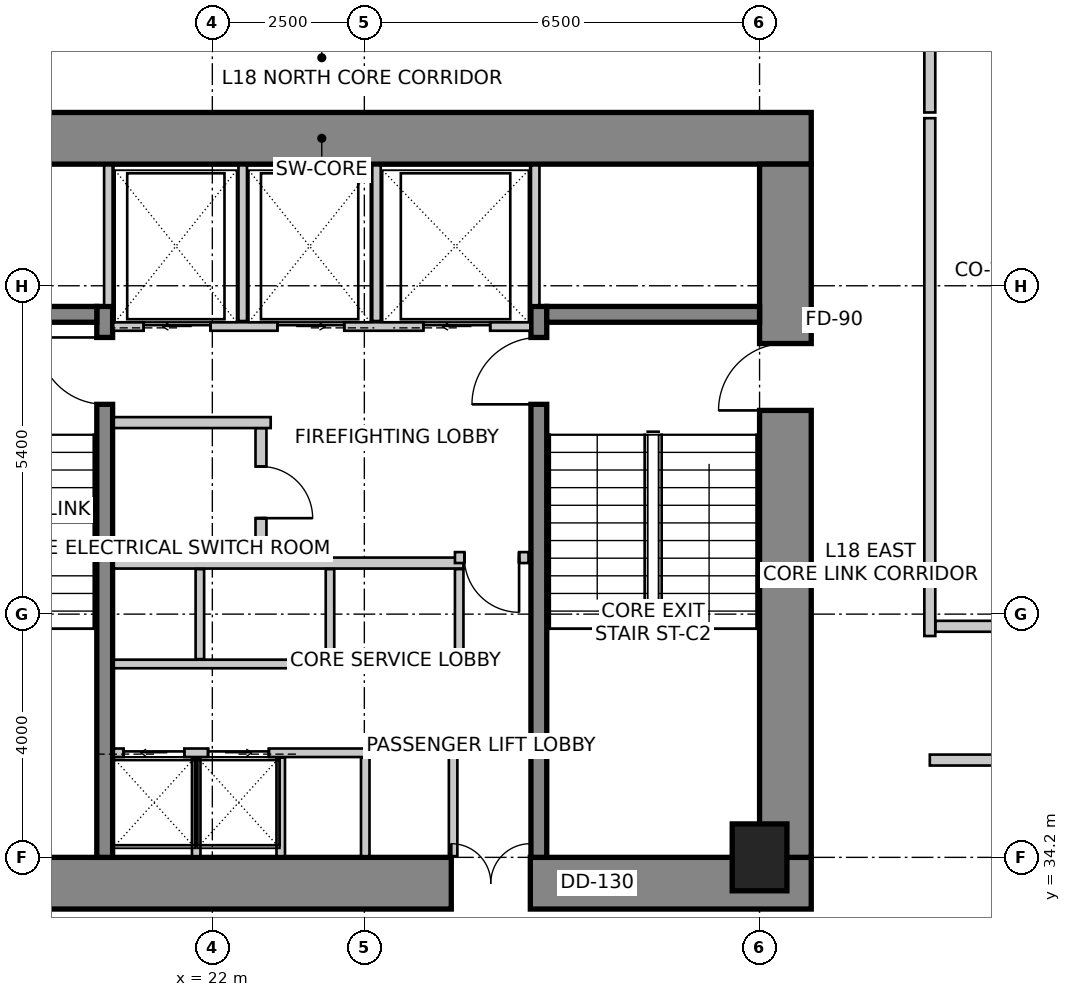
"""IFC4 building model, lengths in metres.
Left out: names, types, materials, properties, quantities, classifications, styles, units other than length and angle.
Written with IfcOpenShell. Run it as: python <this file> out.ifc"""

import sys

from ifc_helpers import new_model, si_unit, direction, frame, frame_2d, origin, origin_2d, place, context, subcontext, project, spatial, rectangle, extrude, source, transform, mapped, element, fill, save


model = new_model("IFC4")
c1 = context("Model", 3, precision=1e-05, world=origin(), true_north=direction((0.0, 1.0)))
c2 = subcontext(c1, "Body", "Model", "MODEL_VIEW")
j1 = project(units=[si_unit("LENGTHUNIT", "METRE"), si_unit("PLANEANGLEUNIT", "RADIAN")], contexts=[c1])
p1 = place(None, origin())
s1 = spatial("IfcSite", under=j1, at=p1, CompositionType="ELEMENT")
p2 = place(p1, origin())
s2 = spatial("IfcBuilding", under=s1, at=p2, CompositionType="ELEMENT")
p3 = place(p2, frame((0.0, 0.0, 75.0)))
s3 = spatial("IfcBuildingStorey", under=s2, at=p3, CompositionType="ELEMENT", Elevation=75.0)
p4 = place(p3, frame((15.75, 46.025, 0.0), z_axis=(0.0, 0.0, 1.0), x_axis=(1.0, 0.0, 0.0)))
e1 = element("IfcWall", 1, at=p4, inside=s3, PredefinedType="SHEAR", context=c2, shape_type="SweptSolid", body=[
    extrude(rectangle(XDim=16.1, YDim=0.85, at=frame_2d((8.05, 0.0))), origin(), (0.0, 0.0, 1.0), 4.0),
])
p5 = place(p3, frame((15.75, 33.775, 0.0), z_axis=(0.0, 0.0, 1.0), x_axis=(1.0, 0.0, 0.0)))
e2 = element("IfcWall", 2, at=p5, inside=s3, PredefinedType="SHEAR", context=c2, shape_type="SweptSolid", body=[
    extrude(rectangle(XDim=16.1, YDim=0.85, at=frame_2d((8.05, 0.0))), origin(), (0.0, 0.0, 1.0), 4.0),
])
m1 = source(origin(), c2, "Body", "SweptSolid", [
    extrude(rectangle(XDim=1.3, YDim=2.15, at=frame_2d((0.65, 1.075))), frame((0.0, 0.435, 0.0), z_axis=(0.0, -1.0, 0.0), x_axis=(1.0, 0.0, 0.0)), (0.0, 0.0, 1.0), 0.87),
])
p6 = place(p5, frame((10.18, 0.0, 0.0)))
e3 = element("IfcOpeningElement", 3, at=p6, cuts=e2, PredefinedType="OPENING", context=c2, shape_type="MappedRepresentation", body=[
    mapped(m1, transform((0.0, 0.0, 0.0), scale=1.0)),
])
p7 = place(p3, frame((31.425, 34.2, 0.0), z_axis=(0.0, 0.0, 1.0), x_axis=(0.0, 1.0, 0.0)))
e4 = element("IfcWall", 4, at=p7, inside=s3, PredefinedType="SHEAR", context=c2, shape_type="SweptSolid", body=[
    extrude(rectangle(XDim=11.4, YDim=0.85, at=frame_2d((5.7, 0.0))), origin(), (0.0, 0.0, 1.0), 4.0),
])
m2 = source(origin(), c2, "Body", "SweptSolid", [
    extrude(rectangle(XDim=1.1, YDim=2.15, at=frame_2d((0.55, 1.075))), frame((0.0, 0.435, 0.0), z_axis=(0.0, -1.0, 0.0), x_axis=(1.0, 0.0, 0.0)), (0.0, 0.0, 1.0), 0.87),
])
p8 = place(p7, frame((7.35, 0.0, 0.0)))
e5 = element("IfcOpeningElement", 5, at=p8, cuts=e4, PredefinedType="OPENING", context=c2, shape_type="MappedRepresentation", body=[
    mapped(m2, transform((0.0, 0.0, 0.0), scale=1.0)),
])
p9 = place(p3, frame((20.23, 34.2, 0.0), z_axis=(0.0, 0.0, 1.0), x_axis=(0.0, 1.0, 0.0)))
e6 = element("IfcWall", 6, at=p9, inside=s3, PredefinedType="SHEAR", context=c2, shape_type="SweptSolid", body=[
    extrude(rectangle(XDim=9.06, YDim=0.26, at=frame_2d((4.53, 0.0))), origin(), (0.0, 0.0, 1.0), 4.0),
])
m3 = source(origin(), c2, "Body", "SweptSolid", [
    extrude(rectangle(XDim=1.1, YDim=2.15, at=frame_2d((0.55, 1.075))), frame((0.0, 0.14, 0.0), z_axis=(0.0, -1.0, 0.0), x_axis=(1.0, 0.0, 0.0)), (0.0, 0.0, 1.0), 0.28),
])
p10 = place(p9, frame((7.45, 0.0, 0.0)))
e7 = element("IfcOpeningElement", 7, at=p10, cuts=e6, PredefinedType="OPENING", context=c2, shape_type="MappedRepresentation", body=[
    mapped(m3, transform((0.0, 0.0, 0.0), scale=1.0)),
])
p11 = place(p3, frame((27.37, 34.2, 0.0), z_axis=(0.0, 0.0, 1.0), x_axis=(0.0, 1.0, 0.0)))
e8 = element("IfcWall", 8, at=p11, inside=s3, PredefinedType="SHEAR", context=c2, shape_type="SweptSolid", body=[
    extrude(rectangle(XDim=9.06, YDim=0.26, at=frame_2d((4.53, 0.0))), origin(), (0.0, 0.0, 1.0), 4.0),
])
p12 = place(p11, frame((7.45, 0.0, 0.0)))
e9 = element("IfcOpeningElement", 9, at=p12, cuts=e8, PredefinedType="OPENING", context=c2, shape_type="MappedRepresentation", body=[
    mapped(m3, transform((0.0, 0.0, 0.0), scale=1.0)),
])
for number, where, z_axis, x_axis in (
    (10, (16.6, 43.13, 0.0), (0.0, 0.0, 1.0), (1.0, 0.0, 0.0)),
    (11, (27.5, 43.13, 0.0), (0.0, 0.0, 1.0), (1.0, 0.0, 0.0)),
):
    element("IfcWall", number, at=place(p3, frame(where, z_axis=z_axis, x_axis=x_axis)), inside=s3, PredefinedType="SHEAR", context=c2, shape_type="SweptSolid", body=[
        extrude(rectangle(XDim=3.5, YDim=0.26, at=frame_2d((1.75, 0.0))), origin(), (0.0, 0.0, 1.0), 4.0),
    ])
m4 = source(origin(), c2, "Body", "SweptSolid", [
    extrude(rectangle(XDim=0.9, YDim=1.1, at=origin_2d()), origin(), (0.0, 0.0, 1.0), 4.0),
])
p13 = place(p3, frame((31.0, 34.2, 0.0), z_axis=(0.0, 0.0, 1.0), x_axis=(1.0, 0.0, 0.0)))
e12 = element("IfcColumn", 12, at=p13, inside=s3, PredefinedType="COLUMN", context=c2, shape_type="MappedRepresentation", body=[
    mapped(m4, transform((0.0, 0.0, 0.0), scale=1.0)),
])
p14 = place(p3, frame((53.961, 47.417, 0.0), z_axis=(0.0, 0.0, 1.0), x_axis=(-0.985865713455, 0.167537443678, 0.0)))
e13 = element("IfcWall", 13, at=p14, inside=s3, PredefinedType="SOLIDWALL", context=c2, shape_type="SweptSolid", body=[
    extrude(rectangle(XDim=32.537, YDim=0.3, at=frame_2d((16.269, 0.0))), origin(), (0.0, 0.0, 1.0), 3.75),
])
m5 = source(origin(), c2, "Body", "SweptSolid", [
    extrude(rectangle(XDim=2.4, YDim=2.2, at=frame_2d((1.2, 1.1))), frame((0.0, 0.16, 0.0), z_axis=(0.0, -1.0, 0.0), x_axis=(1.0, 0.0, 0.0)), (0.0, 0.0, 1.0), 0.32),
])
p15 = place(p14, frame((0.375, 0.0, 0.85)))
e14 = element("IfcOpeningElement", 14, at=p15, cuts=e13, PredefinedType="OPENING", context=c2, shape_type="MappedRepresentation", body=[
    mapped(m5, transform((0.0, 0.0, 0.0), scale=1.0)),
])
m6 = source(origin(), c2, "Body", "SweptSolid", [
    extrude(rectangle(XDim=2.8, YDim=2.4, at=frame_2d((1.4, 1.2))), frame((0.0, 0.16, 0.0), z_axis=(0.0, -1.0, 0.0), x_axis=(1.0, 0.0, 0.0)), (0.0, 0.0, 1.0), 0.32),
])
p16 = place(p14, frame((3.822, 0.0, 0.85)))
e15 = element("IfcOpeningElement", 15, at=p16, cuts=e13, PredefinedType="OPENING", context=c2, shape_type="MappedRepresentation", body=[
    mapped(m6, transform((0.0, 0.0, 0.0), scale=1.0)),
])
p17 = place(p14, frame((8.168, 0.0, 0.85)))
e16 = element("IfcOpeningElement", 16, at=p17, cuts=e13, PredefinedType="OPENING", context=c2, shape_type="MappedRepresentation", body=[
    mapped(m6, transform((0.0, 0.0, 0.0), scale=1.0)),
])
p18 = place(p14, frame((12.513, 0.0, 0.85)))
e17 = element("IfcOpeningElement", 17, at=p18, cuts=e13, PredefinedType="OPENING", context=c2, shape_type="MappedRepresentation", body=[
    mapped(m6, transform((0.0, 0.0, 0.0), scale=1.0)),
])
p19 = place(p14, frame((18.36, 0.0, 0.85)))
e18 = element("IfcOpeningElement", 18, at=p19, cuts=e13, PredefinedType="OPENING", context=c2, shape_type="MappedRepresentation", body=[
    mapped(m6, transform((0.0, 0.0, 0.0), scale=1.0)),
])
p20 = place(p14, frame((24.895, 0.0, 0.85)))
e19 = element("IfcOpeningElement", 19, at=p20, cuts=e13, PredefinedType="OPENING", context=c2, shape_type="MappedRepresentation", body=[
    mapped(m6, transform((0.0, 0.0, 0.0), scale=1.0)),
])
p21 = place(p14, frame((29.395, 0.0, 0.85)))
e20 = element("IfcOpeningElement", 20, at=p21, cuts=e13, PredefinedType="OPENING", context=c2, shape_type="MappedRepresentation", body=[
    mapped(m6, transform((0.0, 0.0, 0.0), scale=1.0)),
])
p22 = place(p3, frame((21.875, 52.742, 0.0), z_axis=(0.0, 0.0, 1.0), x_axis=(-0.843662465249, -0.536873956092, 0.0)))
e21 = element("IfcWall", 21, at=p22, inside=s3, PredefinedType="SOLIDWALL", context=c2, shape_type="SweptSolid", body=[
    extrude(rectangle(XDim=10.284, YDim=0.3, at=frame_2d((5.142, 0.0))), origin(), (0.0, 0.0, 1.0), 3.75),
])
m7 = source(origin(), c2, "Body", "SweptSolid", [
    extrude(rectangle(XDim=0.9, YDim=1.6, at=frame_2d((0.45, 0.8))), frame((0.0, 0.16, 0.0), z_axis=(0.0, -1.0, 0.0), x_axis=(1.0, 0.0, 0.0)), (0.0, 0.0, 1.0), 0.32),
])
p23 = place(p22, frame((0.629, 0.0, 0.85)))
e22 = element("IfcOpeningElement", 22, at=p23, cuts=e21, PredefinedType="OPENING", context=c2, shape_type="MappedRepresentation", body=[
    mapped(m7, transform((0.0, 0.0, 0.0), scale=1.0)),
])
p24 = place(p22, frame((3.542, 0.0, 0.85)))
e23 = element("IfcOpeningElement", 23, at=p24, cuts=e21, PredefinedType="OPENING", context=c2, shape_type="MappedRepresentation", body=[
    mapped(m5, transform((0.0, 0.0, 0.0), scale=1.0)),
])
m8 = source(origin(), c2, "Body", "SweptSolid", [
    extrude(rectangle(XDim=1.5, YDim=1.8, at=frame_2d((0.75, 0.9))), frame((0.0, 0.16, 0.0), z_axis=(0.0, -1.0, 0.0), x_axis=(1.0, 0.0, 0.0)), (0.0, 0.0, 1.0), 0.32),
])
p25 = place(p22, frame((7.903, 0.0, 0.85)))
e24 = element("IfcOpeningElement", 24, at=p25, cuts=e21, PredefinedType="OPENING", context=c2, shape_type="MappedRepresentation", body=[
    mapped(m8, transform((0.0, 0.0, 0.0), scale=1.0)),
])
p26 = place(p3, frame((20.37, 42.93, 0.0), z_axis=(0.0, 0.0, 1.0), x_axis=(1.0, 0.0, 0.0)))
e25 = element("IfcWall", 25, at=p26, inside=s3, PredefinedType="SOLIDWALL", context=c2, shape_type="SweptSolid", body=[
    extrude(rectangle(XDim=6.86, YDim=0.14, at=frame_2d((3.43, 0.0))), origin(), (0.0, 0.0, 1.0), 3.75),
])
m9 = source(origin(), c2, "Body", "SweptSolid", [
    extrude(rectangle(XDim=1.1, YDim=2.15, at=frame_2d((0.55, 1.075))), frame((0.0, 0.08, 0.0), z_axis=(0.0, -1.0, 0.0), x_axis=(1.0, 0.0, 0.0)), (0.0, 0.0, 1.0), 0.16),
])
p27 = place(p26, frame((0.5, 0.0, 0.0)))
e26 = element("IfcOpeningElement", 26, at=p27, cuts=e25, PredefinedType="OPENING", context=c2, shape_type="MappedRepresentation", body=[
    mapped(m9, transform((0.0, 0.0, 0.0), scale=1.0)),
])
p28 = place(p26, frame((2.7, 0.0, 0.0)))
e27 = element("IfcOpeningElement", 27, at=p28, cuts=e25, PredefinedType="OPENING", context=c2, shape_type="MappedRepresentation", body=[
    mapped(m9, transform((0.0, 0.0, 0.0), scale=1.0)),
])
p29 = place(p26, frame((5.1, 0.0, 0.0)))
e28 = element("IfcOpeningElement", 28, at=p29, cuts=e25, PredefinedType="OPENING", context=c2, shape_type="MappedRepresentation", body=[
    mapped(m9, transform((0.0, 0.0, 0.0), scale=1.0)),
])
for number, where, z_axis, x_axis in (
    (29, (20.29, 43.28, 0.0), (0.0, 0.0, 1.0), (0.0, 1.0, 0.0)),
    (30, (27.31, 43.28, 0.0), (0.0, 0.0, 1.0), (0.0, 1.0, 0.0)),
):
    element("IfcWall", number, at=place(p3, frame(where, z_axis=z_axis, x_axis=x_axis)), inside=s3, PredefinedType="SOLIDWALL", context=c2, shape_type="SweptSolid", body=[
        extrude(rectangle(XDim=2.3, YDim=0.14, at=frame_2d((1.15, 0.0))), origin(), (0.0, 0.0, 1.0), 3.75),
    ])
for number, where, z_axis, x_axis in (
    (31, (22.5, 43.02, 0.0), (0.0, 0.0, 1.0), (0.0, 1.0, 0.0)),
    (32, (24.7, 43.02, 0.0), (0.0, 0.0, 1.0), (0.0, 1.0, 0.0)),
):
    element("IfcWall", number, at=place(p3, frame(where, z_axis=z_axis, x_axis=x_axis)), inside=s3, PredefinedType="SOLIDWALL", context=c2, shape_type="SweptSolid", body=[
        extrude(rectangle(XDim=2.56, YDim=0.14, at=frame_2d((1.28, 0.0))), origin(), (0.0, 0.0, 1.0), 3.75),
    ])
p30 = place(p3, frame((20.38, 35.92, 0.0), z_axis=(0.0, 0.0, 1.0), x_axis=(1.0, 0.0, 0.0)))
e33 = element("IfcWall", 33, at=p30, inside=s3, PredefinedType="SOLIDWALL", context=c2, shape_type="SweptSolid", body=[
    extrude(rectangle(XDim=5.65, YDim=0.14, at=frame_2d((2.825, 0.0))), origin(), (0.0, 0.0, 1.0), 3.75),
])
m10 = source(origin(), c2, "Body", "SweptSolid", [
    extrude(rectangle(XDim=1.0, YDim=2.15, at=frame_2d((0.5, 1.075))), frame((0.0, 0.08, 0.0), z_axis=(0.0, -1.0, 0.0), x_axis=(1.0, 0.0, 0.0)), (0.0, 0.0, 1.0), 0.16),
])
p31 = place(p30, frame((0.16, 0.0, 0.0)))
e34 = element("IfcOpeningElement", 34, at=p31, cuts=e33, PredefinedType="OPENING", context=c2, shape_type="MappedRepresentation", body=[
    mapped(m10, transform((0.0, 0.0, 0.0), scale=1.0)),
])
p32 = place(p30, frame((1.55, 0.0, 0.0)))
e35 = element("IfcOpeningElement", 35, at=p32, cuts=e33, PredefinedType="OPENING", context=c2, shape_type="MappedRepresentation", body=[
    mapped(m10, transform((0.0, 0.0, 0.0), scale=1.0)),
])
for number, where, z_axis, x_axis in (
    (36, (25.96, 34.22, 0.0), (0.0, 0.0, 1.0), (0.0, 1.0, 0.0)),
    (37, (21.735, 34.22, 0.0), (0.0, 0.0, 1.0), (0.0, 1.0, 0.0)),
    (38, (23.125, 34.22, 0.0), (0.0, 0.0, 1.0), (0.0, 1.0, 0.0)),
    (39, (24.515, 34.22, 0.0), (0.0, 0.0, 1.0), (0.0, 1.0, 0.0)),
):
    element("IfcWall", number, at=place(p3, frame(where, z_axis=z_axis, x_axis=x_axis)), inside=s3, PredefinedType="SOLIDWALL", context=c2, shape_type="SweptSolid", body=[
        extrude(rectangle(XDim=1.62, YDim=0.14, at=frame_2d((0.81, 0.0))), origin(), (0.0, 0.0, 1.0), 3.042),
    ])
p33 = place(p3, frame((20.38, 37.38, 0.0), z_axis=(0.0, 0.0, 1.0), x_axis=(1.0, 0.0, 0.0)))
e40 = element("IfcWall", 40, at=p33, inside=s3, PredefinedType="SOLIDWALL", context=c2, shape_type="SweptSolid", body=[
    extrude(rectangle(XDim=5.75, YDim=0.14, at=frame_2d((2.875, 0.0))), origin(), (0.0, 0.0, 1.0), 3.75),
])
p34 = place(p3, frame((20.38, 39.04, 0.0), z_axis=(0.0, 0.0, 1.0), x_axis=(1.0, 0.0, 0.0)))
e41 = element("IfcWall", 41, at=p34, inside=s3, PredefinedType="SOLIDWALL", context=c2, shape_type="SweptSolid", body=[
    extrude(rectangle(XDim=5.75, YDim=0.18, at=frame_2d((2.875, 0.0))), origin(), (0.0, 0.0, 1.0), 3.75),
])
for number, where, z_axis, x_axis in (
    (42, (26.06, 37.46, 0.0), (0.0, 0.0, 1.0), (0.0, 1.0, 0.0)),
    (43, (21.795, 37.46, 0.0), (0.0, 0.0, 1.0), (0.0, 1.0, 0.0)),
    (44, (23.935, 37.46, 0.0), (0.0, 0.0, 1.0), (0.0, 1.0, 0.0)),
):
    element("IfcWall", number, at=place(p3, frame(where, z_axis=z_axis, x_axis=x_axis)), inside=s3, PredefinedType="SOLIDWALL", context=c2, shape_type="SweptSolid", body=[
        extrude(rectangle(XDim=1.48, YDim=0.14, at=frame_2d((0.74, 0.0))), origin(), (0.0, 0.0, 1.0), 3.75),
    ])
p35 = place(p3, frame((22.96, 41.35, 0.0), z_axis=(0.0, 0.0, 1.0), x_axis=(-1.0, 0.0, 0.0)))
e45 = element("IfcWall", 45, at=p35, inside=s3, PredefinedType="PARTITIONING", context=c2, shape_type="SweptSolid", body=[
    extrude(rectangle(XDim=2.58, YDim=0.18, at=frame_2d((1.29, 0.0))), origin(), (0.0, 0.0, 1.0), 3.75),
])
p36 = place(p3, frame((22.8, 41.256, 0.0), z_axis=(0.0, 0.0, 1.0), x_axis=(0.0, -1.0, 0.0)))
e46 = element("IfcWall", 46, at=p36, inside=s3, PredefinedType="PARTITIONING", context=c2, shape_type="SweptSolid", body=[
    extrude(rectangle(XDim=2.106, YDim=0.18, at=frame_2d((1.053, 0.0))), origin(), (0.0, 0.0, 1.0), 3.75),
])
m11 = source(origin(), c2, "Body", "SweptSolid", [
    extrude(rectangle(XDim=0.85, YDim=2.15, at=frame_2d((0.425, 1.075))), frame((0.0, 0.1, 0.0), z_axis=(0.0, -1.0, 0.0), x_axis=(1.0, 0.0, 0.0)), (0.0, 0.0, 1.0), 0.2),
])
p37 = place(p36, frame((0.628, 0.0, 0.0)))
e47 = element("IfcOpeningElement", 47, at=p37, cuts=e46, PredefinedType="OPENING", context=c2, shape_type="MappedRepresentation", body=[
    mapped(m11, transform((0.0, 0.0, 0.0), scale=1.0)),
])
p38 = place(p3, frame((27.2, 39.13, 0.0), z_axis=(0.0, 0.0, 1.0), x_axis=(-1.0, 0.0, 0.0)))
e48 = element("IfcWall", 48, at=p38, inside=s3, PredefinedType="PARTITIONING", context=c2, shape_type="SweptSolid", body=[
    extrude(rectangle(XDim=1.21, YDim=0.18, at=frame_2d((0.605, 0.0))), origin(), (0.0, 0.0, 1.0), 3.75),
])
m12 = source(origin(), c2, "Body", "SweptSolid", [
    extrude(rectangle(XDim=0.9, YDim=2.15, at=frame_2d((0.45, 1.075))), frame((0.0, 0.1, 0.0), z_axis=(0.0, -1.0, 0.0), x_axis=(1.0, 0.0, 0.0)), (0.0, 0.0, 1.0), 0.2),
])
p39 = place(p38, frame((0.155, 0.0, 0.0)))
e49 = element("IfcOpeningElement", 49, at=p39, cuts=e48, PredefinedType="OPENING", context=c2, shape_type="MappedRepresentation", body=[
    mapped(m12, transform((0.0, 0.0, 0.0), scale=1.0)),
])
p40 = place(p3, frame((33.8, 48.6, 0.0), z_axis=(0.0, 0.0, 1.0), x_axis=(0.0, -1.0, 0.0)))
e50 = element("IfcWall", 50, at=p40, inside=s3, PredefinedType="PARTITIONING", context=c2, shape_type="SweptSolid", body=[
    extrude(rectangle(XDim=2.15, YDim=0.18, at=frame_2d((1.075, 0.0))), origin(), (0.0, 0.0, 1.0), 2.892),
])
p41 = place(p3, frame((33.8, 46.356, 0.0), z_axis=(0.0, 0.0, 1.0), x_axis=(0.0, -1.0, 0.0)))
e51 = element("IfcWall", 51, at=p41, inside=s3, PredefinedType="PARTITIONING", context=c2, shape_type="SweptSolid", body=[
    extrude(rectangle(XDim=8.516, YDim=0.18, at=frame_2d((4.258, 0.0))), origin(), (0.0, 0.0, 1.0), 3.188),
])
p42 = place(p3, frame((33.894, 38.0, 0.0), z_axis=(0.0, 0.0, 1.0), x_axis=(1.0, 0.0, 0.0)))
e52 = element("IfcWall", 52, at=p42, inside=s3, PredefinedType="PARTITIONING", context=c2, shape_type="SweptSolid", body=[
    extrude(rectangle(XDim=4.35, YDim=0.18, at=frame_2d((2.175, 0.0))), origin(), (0.0, 0.0, 1.0), 3.335),
])
p43 = place(p42, frame((1.725, 0.0, 0.0)))
e53 = element("IfcOpeningElement", 53, at=p43, cuts=e52, PredefinedType="OPENING", context=c2, shape_type="MappedRepresentation", body=[
    mapped(m12, transform((0.0, 0.0, 0.0), scale=1.0)),
])
p44 = place(p3, frame((50.841, 35.8, 0.0), z_axis=(0.0, 0.0, 1.0), x_axis=(-1.0, 0.0, 0.0)))
e54 = element("IfcWall", 54, at=p44, inside=s3, PredefinedType="PARTITIONING", context=c2, shape_type="SweptSolid", body=[
    extrude(rectangle(XDim=17.041, YDim=0.18, at=frame_2d((8.521, 0.0))), origin(), (0.0, 0.0, 1.0), 3.125),
])
p45 = place(p44, frame((8.01, 0.0, 0.0)))
e55 = element("IfcOpeningElement", 55, at=p45, cuts=e54, PredefinedType="OPENING", context=c2, shape_type="MappedRepresentation", body=[
    mapped(m12, transform((0.0, 0.0, 0.0), scale=1.0)),
])
m13 = source(origin(), c2, "Body", "SweptSolid", [
    extrude(rectangle(XDim=1.1, YDim=2.15, at=frame_2d((0.55, 1.075))), frame((0.0, 0.025, 0.0), z_axis=(0.0, -1.0, 0.0), x_axis=(1.0, 0.0, 0.0)), (0.0, 0.0, 1.0), 0.05),
])
p46 = place(p27, origin())
e56 = element("IfcDoor", 56, at=p46, inside=s3, OperationType="SLIDING_TO_LEFT", PredefinedType="DOOR", context=c2, shape_type="MappedRepresentation", body=[
    mapped(m13, transform((0.0, 0.0, 0.0), scale=1.0)),
])
fill(e26, e56)
p47 = place(p28, origin())
e57 = element("IfcDoor", 57, at=p47, inside=s3, OperationType="SLIDING_TO_RIGHT", PredefinedType="DOOR", context=c2, shape_type="MappedRepresentation", body=[
    mapped(m13, transform((0.0, 0.0, 0.0), scale=1.0)),
])
fill(e27, e57)
m14 = source(origin(), c2, "Body", "SweptSolid", [
    extrude(rectangle(XDim=1.1, YDim=2.15, at=frame_2d((0.55, 1.075))), frame((0.0, 0.025, 0.0), z_axis=(0.0, -1.0, 0.0), x_axis=(1.0, 0.0, 0.0)), (0.0, 0.0, 1.0), 0.05),
])
p48 = place(p29, origin())
e58 = element("IfcDoor", 58, at=p48, inside=s3, OperationType="SLIDING_TO_LEFT", PredefinedType="DOOR", context=c2, shape_type="MappedRepresentation", body=[
    mapped(m14, transform((0.0, 0.0, 0.0), scale=1.0)),
])
fill(e28, e58)
m15 = source(origin(), c2, "Body", "SweptSolid", [
    extrude(rectangle(XDim=1.0, YDim=2.15, at=frame_2d((0.5, 1.075))), frame((0.0, 0.025, 0.0), z_axis=(0.0, -1.0, 0.0), x_axis=(1.0, 0.0, 0.0)), (0.0, 0.0, 1.0), 0.05),
])
p49 = place(p31, origin())
e59 = element("IfcDoor", 59, at=p49, inside=s3, OperationType="SLIDING_TO_LEFT", PredefinedType="DOOR", context=c2, shape_type="MappedRepresentation", body=[
    mapped(m15, transform((0.0, 0.0, 0.0), scale=1.0)),
])
fill(e34, e59)
p50 = place(p32, origin())
e60 = element("IfcDoor", 60, at=p50, inside=s3, OperationType="SLIDING_TO_RIGHT", PredefinedType="DOOR", context=c2, shape_type="MappedRepresentation", body=[
    mapped(m15, transform((0.0, 0.0, 0.0), scale=1.0)),
])
fill(e35, e60)
m16 = source(origin(), c2, "Body", "SweptSolid", [
    extrude(rectangle(XDim=1.1, YDim=2.15, at=frame_2d((0.55, 1.075))), frame((0.0, 0.025, 0.0), z_axis=(0.0, -1.0, 0.0), x_axis=(1.0, 0.0, 0.0)), (0.0, 0.0, 1.0), 0.05),
])
p51 = place(p10, origin())
e61 = element("IfcDoor", 61, at=p51, inside=s3, OperationType="SINGLE_SWING_RIGHT", PredefinedType="DOOR", context=c2, shape_type="MappedRepresentation", body=[
    mapped(m16, transform((0.0, 0.0, 0.0), scale=1.0)),
])
fill(e7, e61)
p52 = place(p12, origin())
e62 = element("IfcDoor", 62, at=p52, inside=s3, OperationType="SINGLE_SWING_LEFT", PredefinedType="DOOR", context=c2, shape_type="MappedRepresentation", body=[
    mapped(m16, transform((0.0, 0.0, 0.0), scale=1.0)),
])
fill(e9, e62)
p53 = place(p8, origin())
e63 = element("IfcDoor", 63, at=p53, inside=s3, OperationType="SINGLE_SWING_LEFT", PredefinedType="DOOR", context=c2, shape_type="MappedRepresentation", body=[
    mapped(m16, transform((0.0, 0.0, 0.0), scale=1.0)),
])
fill(e5, e63)
m17 = source(origin(), c2, "Body", "SweptSolid", [
    extrude(rectangle(XDim=1.3, YDim=2.15, at=frame_2d((0.65, 1.075))), frame((0.0, 0.025, 0.0), z_axis=(0.0, -1.0, 0.0), x_axis=(1.0, 0.0, 0.0)), (0.0, 0.0, 1.0), 0.05),
])
p54 = place(p6, origin())
e64 = element("IfcDoor", 64, at=p54, inside=s3, OperationType="DOUBLE_DOOR_SINGLE_SWING", PredefinedType="DOOR", context=c2, shape_type="MappedRepresentation", body=[
    mapped(m17, transform((0.0, 0.0, 0.0), scale=1.0)),
])
fill(e3, e64)
m18 = source(origin(), c2, "Body", "SweptSolid", [
    extrude(rectangle(XDim=0.85, YDim=2.15, at=frame_2d((0.425, 1.075))), frame((0.0, 0.025, 0.0), z_axis=(0.0, -1.0, 0.0), x_axis=(1.0, 0.0, 0.0)), (0.0, 0.0, 1.0), 0.05),
])
p55 = place(p37, origin())
e65 = element("IfcDoor", 65, at=p55, inside=s3, OperationType="SINGLE_SWING_RIGHT", PredefinedType="DOOR", context=c2, shape_type="MappedRepresentation", body=[
    mapped(m18, transform((0.0, 0.0, 0.0), scale=1.0)),
])
fill(e47, e65)
m19 = source(origin(), c2, "Body", "SweptSolid", [
    extrude(rectangle(XDim=0.9, YDim=2.15, at=frame_2d((0.45, 1.075))), frame((0.0, 0.025, 0.0), z_axis=(0.0, -1.0, 0.0), x_axis=(1.0, 0.0, 0.0)), (0.0, 0.0, 1.0), 0.05),
])
p56 = place(p39, origin())
e66 = element("IfcDoor", 66, at=p56, inside=s3, OperationType="SINGLE_SWING_LEFT", PredefinedType="DOOR", context=c2, shape_type="MappedRepresentation", body=[
    mapped(m19, transform((0.0, 0.0, 0.0), scale=1.0)),
])
fill(e49, e66)
save(model, sys.argv[1])
